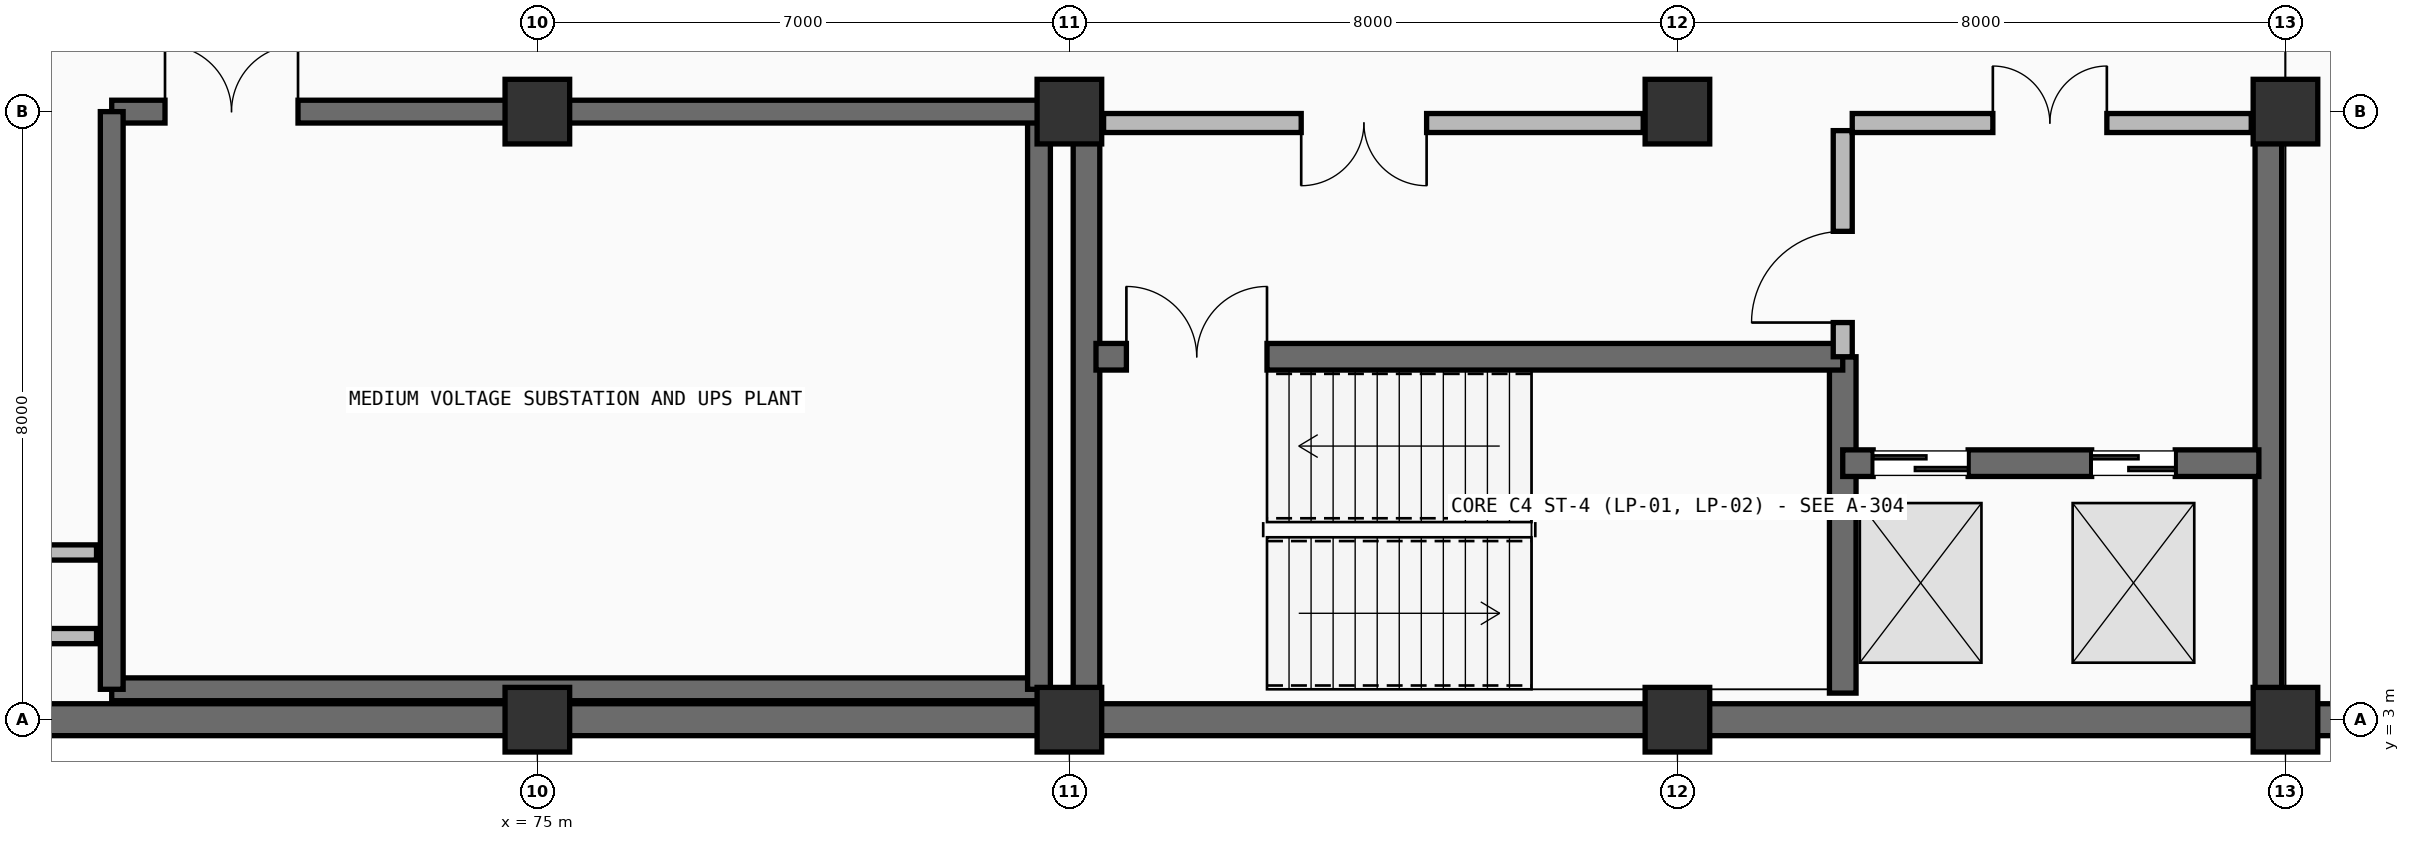
"""IFC4 building model, lengths in metres.
Left out: names, types, materials, properties, quantities, classifications, styles, units other than length and angle.
Written with IfcOpenShell. Run it as: python <this file> out.ifc"""

import sys

from ifc_helpers import new_model, si_unit, direction, frame, frame_2d, origin, origin_2d, place, context, subcontext, project, spatial, rectangle, extrude, element, fill, save


model = new_model("IFC4")
c1 = context("Model", 3, precision=1e-05, world=origin(), true_north=direction((0.0, 1.0)))
c2 = subcontext(c1, "Body", "Model", "MODEL_VIEW")
j1 = project(units=[si_unit("LENGTHUNIT", "METRE"), si_unit("PLANEANGLEUNIT", "RADIAN")], contexts=[c1])
p1 = place(None, origin())
s1 = spatial("IfcSite", under=j1, at=p1, CompositionType="ELEMENT")
p2 = place(p1, origin())
s2 = spatial("IfcBuilding", under=s1, at=p2, CompositionType="ELEMENT")
p3 = place(p2, frame((0.0, 0.0, -4.5)))
s3 = spatial("IfcBuildingStorey", under=s2, at=p3, CompositionType="ELEMENT", Elevation=-4.5)
for number, where, z_axis, x_axis in (
    (1, (75.0, 3.0, -0.6), (0.0, 0.0, 1.0), (1.0, 0.0, 0.0)),
    (2, (75.0, 11.0, -0.6), (0.0, 0.0, 1.0), (1.0, 0.0, 0.0)),
    (3, (82.0, 3.0, -0.6), (0.0, 0.0, 1.0), (1.0, 0.0, 0.0)),
    (4, (82.0, 11.0, -0.6), (0.0, 0.0, 1.0), (1.0, 0.0, 0.0)),
    (5, (90.0, 3.0, -0.6), (0.0, 0.0, 1.0), (1.0, 0.0, 0.0)),
    (6, (90.0, 11.0, -0.6), (0.0, 0.0, 1.0), (1.0, 0.0, 0.0)),
    (7, (98.0, 3.0, -0.6), (0.0, 0.0, 1.0), (1.0, 0.0, 0.0)),
    (8, (98.0, 11.0, -0.6), (0.0, 0.0, 1.0), (1.0, 0.0, 0.0)),
):
    element("IfcColumn", number, at=place(p3, frame(where, z_axis=z_axis, x_axis=x_axis)), inside=s3, PredefinedType="COLUMN", context=c2, shape_type="SweptSolid", body=[
        extrude(rectangle(XDim=0.85, YDim=0.85, at=origin_2d()), origin(), (0.0, 0.0, 1.0), 5.1),
    ])
for number, where, z_axis, x_axis in (
    (9, (106.0, 3.0, 0.0), (0.0, 0.0, 1.0), (-1.0, 0.0, 0.0)),
    (10, (98.0, 3.0, 0.0), (0.0, 0.0, 1.0), (-1.0, 0.0, 0.0)),
    (11, (90.0, 3.0, 0.0), (0.0, 0.0, 1.0), (-1.0, 0.0, 0.0)),
):
    element("IfcWall", number, at=place(p3, frame(where, z_axis=z_axis, x_axis=x_axis)), inside=s3, PredefinedType="USERDEFINED", context=c2, shape_type="SweptSolid", body=[
        extrude(rectangle(XDim=8.0, YDim=0.42, at=frame_2d((4.0, 0.0))), origin(), (0.0, 0.0, 1.0), 4.5),
    ])
p4 = place(p3, frame((82.0, 3.0, 0.0), z_axis=(0.0, 0.0, 1.0), x_axis=(-1.0, 0.0, 0.0)))
e12 = element("IfcWall", 12, at=p4, inside=s3, PredefinedType="USERDEFINED", context=c2, shape_type="SweptSolid", body=[
    extrude(rectangle(XDim=7.0, YDim=0.42, at=frame_2d((3.5, 0.0))), origin(), (0.0, 0.0, 1.0), 4.5),
])
p5 = place(p3, frame((75.0, 3.0, 0.0), z_axis=(0.0, 0.0, 1.0), x_axis=(-1.0, 0.0, 0.0)))
e13 = element("IfcWall", 13, at=p5, inside=s3, PredefinedType="USERDEFINED", context=c2, shape_type="SweptSolid", body=[
    extrude(rectangle(XDim=8.0, YDim=0.42, at=frame_2d((4.0, 0.0))), origin(), (0.0, 0.0, 1.0), 4.5),
])
p6 = place(p3, frame((82.225, 3.2, 0.0), z_axis=(0.0, 0.0, 1.0), x_axis=(0.0, 1.0, 0.0)))
e14 = element("IfcWall", 14, at=p6, inside=s3, PredefinedType="SHEAR", context=c2, shape_type="SweptSolid", body=[
    extrude(rectangle(XDim=7.6, YDim=0.35, at=frame_2d((3.8, 0.0))), origin(), (0.0, 0.0, 1.0), 4.2),
])
p7 = place(p3, frame((92.175, 3.35, 0.0), z_axis=(0.0, 0.0, 1.0), x_axis=(0.0, 1.0, 0.0)))
e15 = element("IfcWall", 15, at=p7, inside=s3, PredefinedType="SHEAR", context=c2, shape_type="SweptSolid", body=[
    extrude(rectangle(XDim=4.425, YDim=0.35, at=frame_2d((2.212, 0.0))), origin(), (0.0, 0.0, 1.0), 4.2),
])
p8 = place(p3, frame((97.775, 3.2, 0.0), z_axis=(0.0, 0.0, 1.0), x_axis=(0.0, 1.0, 0.0)))
e16 = element("IfcWall", 16, at=p8, inside=s3, PredefinedType="SHEAR", context=c2, shape_type="SweptSolid", body=[
    extrude(rectangle(XDim=7.6, YDim=0.35, at=frame_2d((3.8, 0.0))), origin(), (0.0, 0.0, 1.0), 4.2),
])
p9 = place(p3, frame((82.35, 7.775, 0.0), z_axis=(0.0, 0.0, 1.0), x_axis=(1.0, 0.0, 0.0)))
e17 = element("IfcWall", 17, at=p9, inside=s3, PredefinedType="SHEAR", context=c2, shape_type="SweptSolid", body=[
    extrude(rectangle(XDim=9.825, YDim=0.35, at=frame_2d((4.913, 0.0))), origin(), (0.0, 0.0, 1.0), 4.2),
])
p10 = place(p9, frame((0.4, 0.0, 0.0)))
e18 = element("IfcOpeningElement", 18, at=p10, cuts=e17, PredefinedType="OPENING", context=c2, shape_type="SweptSolid", body=[
    extrude(rectangle(XDim=1.85, YDim=2.25, at=frame_2d((0.925, 1.125))), frame((0.0, 0.185, 0.0), z_axis=(0.0, -1.0, 0.0), x_axis=(1.0, 0.0, 0.0)), (0.0, 0.0, 1.0), 0.37),
])
p11 = place(p3, frame((92.175, 6.375, 0.0), z_axis=(0.0, 0.0, 1.0), x_axis=(1.0, 0.0, 0.0)))
e19 = element("IfcWall", 19, at=p11, inside=s3, PredefinedType="SHEAR", context=c2, shape_type="SweptSolid", body=[
    extrude(rectangle(XDim=5.475, YDim=0.35, at=frame_2d((2.737, 0.0))), origin(), (0.0, 0.0, 1.0), 4.2),
])
p12 = place(p11, frame((0.4, 0.0, 0.0)))
e20 = element("IfcOpeningElement", 20, at=p12, cuts=e19, PredefinedType="OPENING", context=c2, shape_type="SweptSolid", body=[
    extrude(rectangle(XDim=1.25, YDim=2.25, at=frame_2d((0.625, 1.125))), frame((0.0, 0.185, 0.0), z_axis=(0.0, -1.0, 0.0), x_axis=(1.0, 0.0, 0.0)), (0.0, 0.0, 1.0), 0.37),
])
p13 = place(p11, frame((3.275, 0.0, 0.0)))
e21 = element("IfcOpeningElement", 21, at=p13, cuts=e19, PredefinedType="OPENING", context=c2, shape_type="SweptSolid", body=[
    extrude(rectangle(XDim=1.1, YDim=2.2, at=frame_2d((0.55, 1.1))), frame((0.0, 0.185, 0.0), z_axis=(0.0, -1.0, 0.0), x_axis=(1.0, 0.0, 0.0)), (0.0, 0.0, 1.0), 0.37),
])
p14 = place(p3, frame((92.175, 7.775, 0.0), z_axis=(0.0, 0.0, 1.0), x_axis=(0.0, 1.0, 0.0)))
e22 = element("IfcWall", 22, at=p14, inside=s3, PredefinedType="PARTITIONING", context=c2, shape_type="SweptSolid", body=[
    extrude(rectangle(XDim=2.975, YDim=0.25, at=frame_2d((1.488, 0.0))), origin(), (0.0, 0.0, 1.0), 4.2),
])
p15 = place(p14, frame((0.45, 0.0, 0.0)))
e23 = element("IfcOpeningElement", 23, at=p15, cuts=e22, PredefinedType="OPENING", context=c2, shape_type="SweptSolid", body=[
    extrude(rectangle(XDim=1.2, YDim=2.2, at=frame_2d((0.6, 1.1))), frame((0.0, 0.135, 0.0), z_axis=(0.0, -1.0, 0.0), x_axis=(1.0, 0.0, 0.0)), (0.0, 0.0, 1.0), 0.27),
])
p16 = place(p3, frame((82.45, 10.85, 0.0), z_axis=(0.0, 0.0, 1.0), x_axis=(1.0, 0.0, 0.0)))
e24 = element("IfcWall", 24, at=p16, inside=s3, PredefinedType="PARTITIONING", context=c2, shape_type="SweptSolid", body=[
    extrude(rectangle(XDim=7.1, YDim=0.25, at=frame_2d((3.55, 0.0))), origin(), (0.0, 0.0, 1.0), 3.435),
])
p17 = place(p16, frame((2.6, 0.0, 0.0)))
e25 = element("IfcOpeningElement", 25, at=p17, cuts=e24, PredefinedType="OPENING", context=c2, shape_type="SweptSolid", body=[
    extrude(rectangle(XDim=1.65, YDim=2.25, at=frame_2d((0.825, 1.125))), frame((0.0, 0.135, 0.0), z_axis=(0.0, -1.0, 0.0), x_axis=(1.0, 0.0, 0.0)), (0.0, 0.0, 1.0), 0.27),
])
p18 = place(p3, frame((92.3, 10.85, 0.0), z_axis=(0.0, 0.0, 1.0), x_axis=(1.0, 0.0, 0.0)))
e26 = element("IfcWall", 26, at=p18, inside=s3, PredefinedType="PARTITIONING", context=c2, shape_type="SweptSolid", body=[
    extrude(rectangle(XDim=5.25, YDim=0.25, at=frame_2d((2.625, 0.0))), origin(), (0.0, 0.0, 1.0), 3.435),
])
p19 = place(p18, frame((1.85, 0.0, 0.0)))
e27 = element("IfcOpeningElement", 27, at=p19, cuts=e26, PredefinedType="OPENING", context=c2, shape_type="SweptSolid", body=[
    extrude(rectangle(XDim=1.5, YDim=2.2, at=frame_2d((0.75, 1.1))), frame((0.0, 0.135, 0.0), z_axis=(0.0, -1.0, 0.0), x_axis=(1.0, 0.0, 0.0)), (0.0, 0.0, 1.0), 0.27),
])
p20 = place(p3, frame((69.4, 3.4, 0.0), z_axis=(0.0, 0.0, 1.0), x_axis=(1.0, 0.0, 0.0)))
e28 = element("IfcWall", 28, at=p20, inside=s3, PredefinedType="SHEAR", context=c2, shape_type="SweptSolid", body=[
    extrude(rectangle(XDim=12.2, YDim=0.3, at=frame_2d((6.1, 0.0))), origin(), (0.0, 0.0, 1.0), 4.2),
])
p21 = place(p3, frame((81.6, 3.4, 0.0), z_axis=(0.0, 0.0, 1.0), x_axis=(0.0, 1.0, 0.0)))
e29 = element("IfcWall", 29, at=p21, inside=s3, PredefinedType="SHEAR", context=c2, shape_type="SweptSolid", body=[
    extrude(rectangle(XDim=7.6, YDim=0.3, at=frame_2d((3.8, 0.0))), origin(), (0.0, 0.0, 1.0), 4.2),
])
p22 = place(p3, frame((69.4, 11.0, 0.0), z_axis=(0.0, 0.0, 1.0), x_axis=(1.0, 0.0, 0.0)))
e30 = element("IfcWall", 30, at=p22, inside=s3, PredefinedType="SHEAR", context=c2, shape_type="SweptSolid", body=[
    extrude(rectangle(XDim=12.2, YDim=0.3, at=frame_2d((6.1, 0.0))), origin(), (0.0, 0.0, 1.0), 4.2),
])
p23 = place(p22, frame((0.701, 0.0, 0.0)))
e31 = element("IfcOpeningElement", 31, at=p23, cuts=e30, PredefinedType="OPENING", context=c2, shape_type="SweptSolid", body=[
    extrude(rectangle(XDim=1.75, YDim=2.28, at=frame_2d((0.875, 1.14))), frame((0.0, 0.16, 0.0), z_axis=(0.0, -1.0, 0.0), x_axis=(1.0, 0.0, 0.0)), (0.0, 0.0, 1.0), 0.32),
])
p24 = place(p3, frame((69.4, 3.4, 0.0), z_axis=(0.0, 0.0, 1.0), x_axis=(0.0, 1.0, 0.0)))
e32 = element("IfcWall", 32, at=p24, inside=s3, PredefinedType="SHEAR", context=c2, shape_type="SweptSolid", body=[
    extrude(rectangle(XDim=7.6, YDim=0.3, at=frame_2d((3.8, 0.0))), origin(), (0.0, 0.0, 1.0), 4.2),
])
for number, where, z_axis, x_axis in (
    (33, (68.1, 4.1, 0.0), (0.0, 0.0, 1.0), (1.0, 0.0, 0.0)),
    (34, (68.1, 5.2, 0.0), (0.0, 0.0, 1.0), (1.0, 0.0, 0.0)),
):
    element("IfcWall", number, at=place(p3, frame(where, z_axis=z_axis, x_axis=x_axis)), inside=s3, PredefinedType="PARTITIONING", context=c2, shape_type="SweptSolid", body=[
        extrude(rectangle(XDim=1.1, YDim=0.2, at=frame_2d((0.55, 0.0))), origin(), (0.0, 0.0, 1.0), 4.2),
    ])
p25 = place(p10, origin())
e35 = element("IfcDoor", 35, at=p25, inside=s3, OperationType="DOUBLE_DOOR_SINGLE_SWING", PredefinedType="DOOR", context=c2, shape_type="SweptSolid", body=[
    extrude(rectangle(XDim=1.85, YDim=2.25, at=frame_2d((0.925, 1.125))), frame((0.0, 0.025, 0.0), z_axis=(0.0, -1.0, 0.0), x_axis=(1.0, 0.0, 0.0)), (0.0, 0.0, 1.0), 0.05),
])
fill(e18, e35)
p26 = place(p12, origin())
e36 = element("IfcDoor", 36, at=p26, inside=s3, OperationType="DOUBLE_DOOR_SLIDING", PredefinedType="DOOR", context=c2, shape_type="SweptSolid", body=[
    extrude(rectangle(XDim=1.25, YDim=2.25, at=frame_2d((0.625, 1.125))), frame((0.0, 0.025, 0.0), z_axis=(0.0, -1.0, 0.0), x_axis=(1.0, 0.0, 0.0)), (0.0, 0.0, 1.0), 0.05),
])
fill(e20, e36)
p27 = place(p13, origin())
e37 = element("IfcDoor", 37, at=p27, inside=s3, OperationType="DOUBLE_DOOR_SLIDING", PredefinedType="DOOR", context=c2, shape_type="SweptSolid", body=[
    extrude(rectangle(XDim=1.1, YDim=2.2, at=frame_2d((0.55, 1.1))), frame((0.0, 0.025, 0.0), z_axis=(0.0, -1.0, 0.0), x_axis=(1.0, 0.0, 0.0)), (0.0, 0.0, 1.0), 0.05),
])
fill(e21, e37)
p28 = place(p15, origin())
e38 = element("IfcDoor", 38, at=p28, inside=s3, OperationType="SINGLE_SWING_LEFT", PredefinedType="DOOR", context=c2, shape_type="SweptSolid", body=[
    extrude(rectangle(XDim=1.2, YDim=2.2, at=frame_2d((0.6, 1.1))), frame((0.0, 0.025, 0.0), z_axis=(0.0, -1.0, 0.0), x_axis=(1.0, 0.0, 0.0)), (0.0, 0.0, 1.0), 0.05),
])
fill(e23, e38)
p29 = place(p17, frame((1.65, 0.0, 0.0), z_axis=(0.0, 0.0, 1.0), x_axis=(-1.0, 0.0, 0.0)))
e39 = element("IfcDoor", 39, at=p29, inside=s3, OperationType="DOUBLE_DOOR_SINGLE_SWING", PredefinedType="DOOR", context=c2, shape_type="SweptSolid", body=[
    extrude(rectangle(XDim=1.65, YDim=2.25, at=frame_2d((0.825, 1.125))), frame((0.0, 0.025, 0.0), z_axis=(0.0, -1.0, 0.0), x_axis=(1.0, 0.0, 0.0)), (0.0, 0.0, 1.0), 0.05),
])
fill(e25, e39)
p30 = place(p19, origin())
e40 = element("IfcDoor", 40, at=p30, inside=s3, OperationType="DOUBLE_DOOR_SINGLE_SWING", PredefinedType="DOOR", context=c2, shape_type="SweptSolid", body=[
    extrude(rectangle(XDim=1.5, YDim=2.2, at=frame_2d((0.75, 1.1))), frame((0.0, 0.025, 0.0), z_axis=(0.0, -1.0, 0.0), x_axis=(1.0, 0.0, 0.0)), (0.0, 0.0, 1.0), 0.05),
])
fill(e27, e40)
p31 = place(p23, origin())
e41 = element("IfcDoor", 41, at=p31, inside=s3, OperationType="DOUBLE_DOOR_SINGLE_SWING", PredefinedType="DOOR", context=c2, shape_type="SweptSolid", body=[
    extrude(rectangle(XDim=1.75, YDim=2.28, at=frame_2d((0.875, 1.14))), frame((0.0, 0.025, 0.0), z_axis=(0.0, -1.0, 0.0), x_axis=(1.0, 0.0, 0.0)), (0.0, 0.0, 1.0), 0.05),
])
fill(e31, e41)
save(model, sys.argv[1])
